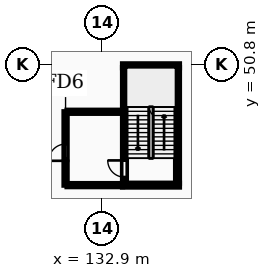
"""IFC4 building model, lengths in metres.
Left out: names, types, materials, properties, quantities, classifications, styles, units other than length and angle.
Written with IfcOpenShell. Run it as: python <this file> out.ifc"""

import sys

from ifc_helpers import new_model, si_unit, direction, frame, frame_2d, origin, place, context, subcontext, project, spatial, rectangle, extrude, element, fill, save


model = new_model("IFC4")
c1 = context("Model", 3, precision=1e-05, world=origin(), true_north=direction((0.0, 1.0)))
c2 = subcontext(c1, "Body", "Model", "MODEL_VIEW")
j1 = project(units=[si_unit("LENGTHUNIT", "METRE"), si_unit("PLANEANGLEUNIT", "RADIAN")], contexts=[c1])
p1 = place(None, origin())
s1 = spatial("IfcSite", under=j1, at=p1, CompositionType="ELEMENT")
p2 = place(p1, origin())
s2 = spatial("IfcBuilding", under=s1, at=p2, CompositionType="ELEMENT")
p3 = place(p2, frame((0.0, 0.0, 5.4)))
s3 = spatial("IfcBuildingStorey", under=s2, at=p3, CompositionType="ELEMENT", Elevation=5.4)
p4 = place(p3, frame((134.375, 43.0, 0.0), z_axis=(0.0, 0.0, 1.0), x_axis=(0.0, 1.0, 0.0)))
e1 = element("IfcWall", 1, at=p4, inside=s3, PredefinedType="SHEAR", context=c2, shape_type="SweptSolid", body=[
    extrude(rectangle(XDim=7.6, YDim=0.25, at=frame_2d((3.8, 0.0))), origin(), (0.0, 0.0, 1.0), 4.6),
])
p5 = place(p4, frame((0.4, 0.0, 0.0)))
e2 = element("IfcOpeningElement", 2, at=p5, cuts=e1, PredefinedType="OPENING", context=c2, shape_type="SweptSolid", body=[
    extrude(rectangle(XDim=1.1, YDim=2.1, at=frame_2d((0.55, 1.05))), frame((0.0, 0.135, 0.0), z_axis=(0.0, -1.0, 0.0), x_axis=(1.0, 0.0, 0.0)), (0.0, 0.0, 1.0), 0.27),
])
p6 = place(p3, frame((137.865, 43.0, 0.0), z_axis=(0.0, 0.0, 1.0), x_axis=(0.0, 1.0, 0.0)))
e3 = element("IfcWall", 3, at=p6, inside=s3, PredefinedType="SHEAR", context=c2, shape_type="SweptSolid", body=[
    extrude(rectangle(XDim=7.6, YDim=0.25, at=frame_2d((3.8, 0.0))), origin(), (0.0, 0.0, 1.0), 4.6),
])
for number, where, z_axis, x_axis in (
    (4, (134.25, 42.875, 0.0), (0.0, 0.0, 1.0), (1.0, 0.0, 0.0)),
    (5, (134.25, 50.725, 0.0), (0.0, 0.0, 1.0), (1.0, 0.0, 0.0)),
):
    element("IfcWall", number, at=place(p3, frame(where, z_axis=z_axis, x_axis=x_axis)), inside=s3, PredefinedType="SHEAR", context=c2, shape_type="SweptSolid", body=[
        extrude(rectangle(XDim=3.74, YDim=0.25, at=frame_2d((1.87, 0.0))), origin(), (0.0, 0.0, 1.0), 4.6),
    ])
p7 = place(p3, frame((130.5, 42.875, 0.0), z_axis=(0.0, 0.0, 1.0), x_axis=(0.0, 1.0, 0.0)))
e6 = element("IfcWall", 6, at=p7, inside=s3, PredefinedType="PARTITIONING", context=c2, shape_type="SweptSolid", body=[
    extrude(rectangle(XDim=4.825, YDim=0.2, at=frame_2d((2.413, 0.0))), origin(), (0.0, 0.0, 1.0), 4.3),
])
p8 = place(p7, frame((1.6, 0.0, 0.0)))
e7 = element("IfcOpeningElement", 7, at=p8, cuts=e6, PredefinedType="OPENING", context=c2, shape_type="SweptSolid", body=[
    extrude(rectangle(XDim=1.1, YDim=2.15, at=frame_2d((0.55, 1.075))), frame((0.0, 0.11, 0.0), z_axis=(0.0, -1.0, 0.0), x_axis=(1.0, 0.0, 0.0)), (0.0, 0.0, 1.0), 0.22),
])
for number, where, z_axis, x_axis in (
    (8, (130.6, 42.875, 0.0), (0.0, 0.0, 1.0), (1.0, 0.0, 0.0)),
    (9, (130.6, 47.7, 0.0), (0.0, 0.0, 1.0), (1.0, 0.0, 0.0)),
):
    element("IfcWall", number, at=place(p3, frame(where, z_axis=z_axis, x_axis=x_axis)), inside=s3, PredefinedType="PARTITIONING", context=c2, shape_type="SweptSolid", body=[
        extrude(rectangle(XDim=3.65, YDim=0.2, at=frame_2d((1.825, 0.0))), origin(), (0.0, 0.0, 1.0), 4.3),
    ])
p9 = place(p5, origin())
e10 = element("IfcDoor", 10, at=p9, inside=s3, OperationType="SINGLE_SWING_RIGHT", PredefinedType="DOOR", context=c2, shape_type="SweptSolid", body=[
    extrude(rectangle(XDim=1.1, YDim=2.1, at=frame_2d((0.55, 1.05))), frame((0.0, 0.025, 0.0), z_axis=(0.0, -1.0, 0.0), x_axis=(1.0, 0.0, 0.0)), (0.0, 0.0, 1.0), 0.05),
])
fill(e2, e10)
p10 = place(p8, origin())
e11 = element("IfcDoor", 11, at=p10, inside=s3, OperationType="SINGLE_SWING_LEFT", PredefinedType="DOOR", context=c2, shape_type="SweptSolid", body=[
    extrude(rectangle(XDim=1.1, YDim=2.15, at=frame_2d((0.55, 1.075))), frame((0.0, 0.025, 0.0), z_axis=(0.0, -1.0, 0.0), x_axis=(1.0, 0.0, 0.0)), (0.0, 0.0, 1.0), 0.05),
])
fill(e7, e11)
save(model, sys.argv[1])
